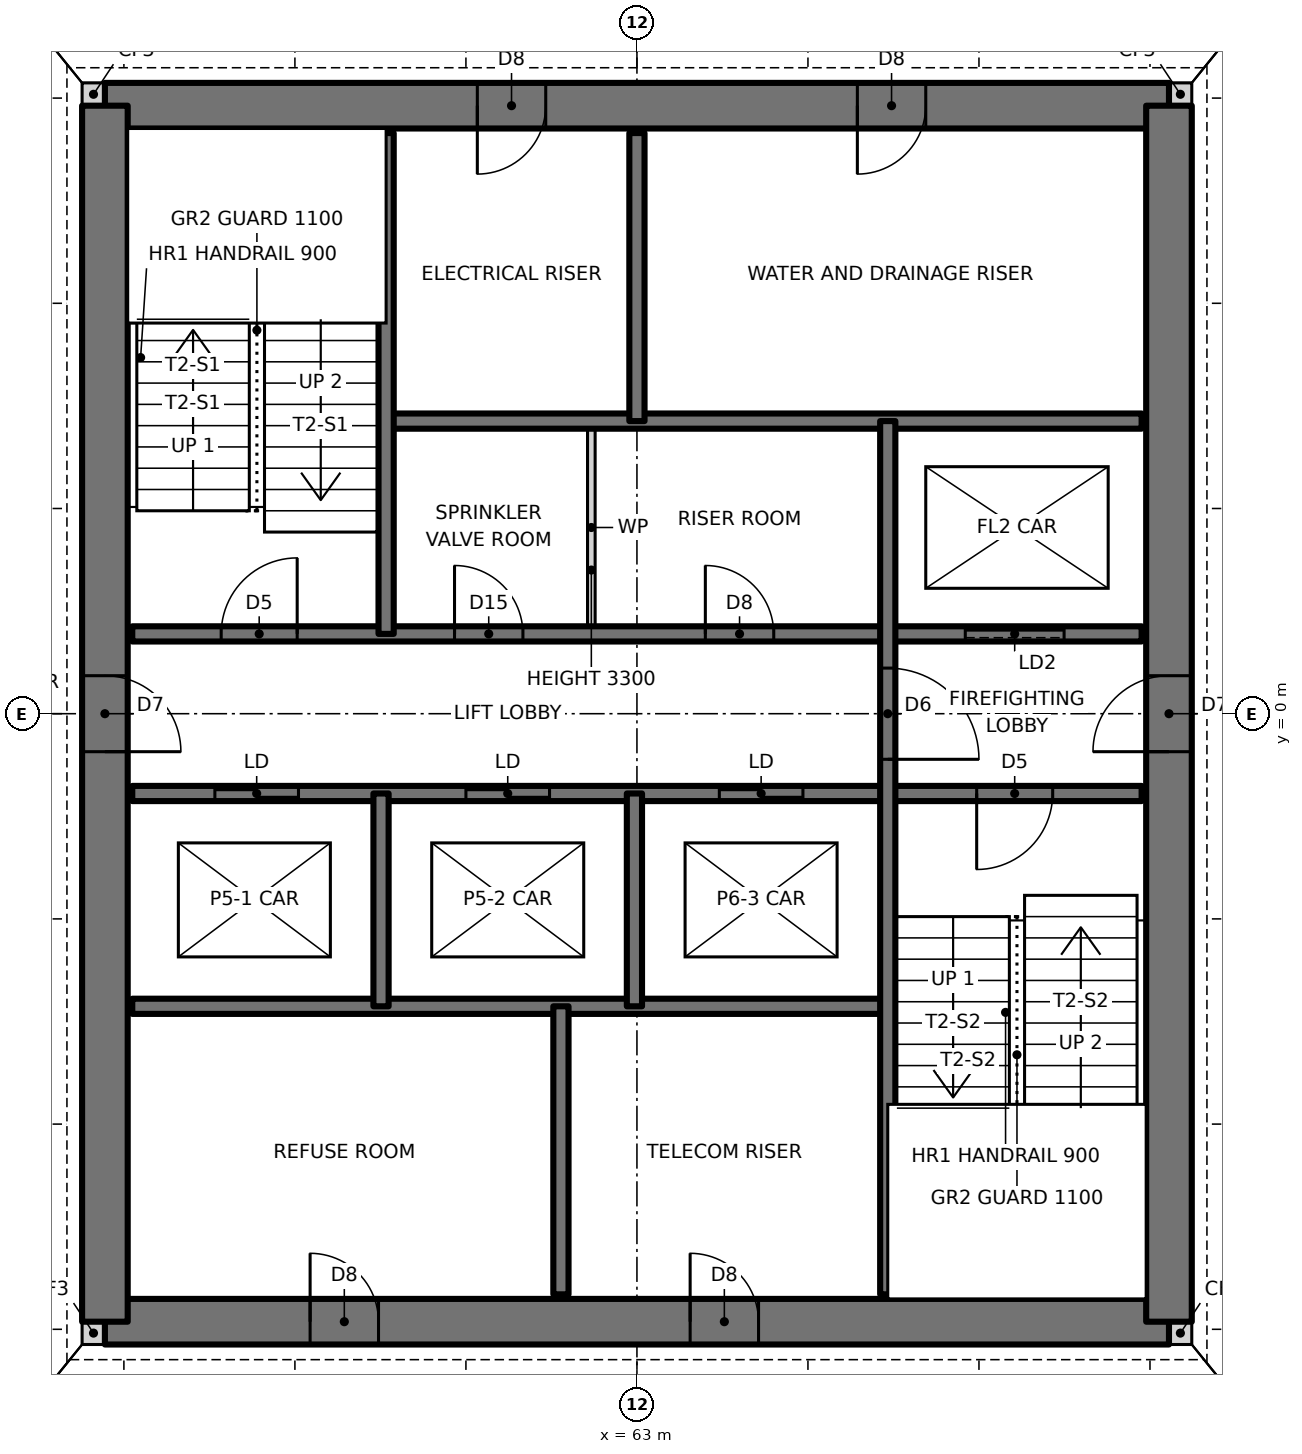
"""IFC4 building model, lengths in metres.
Left out: names, types, materials, properties, quantities, classifications, styles, units other than length and angle.
Written with IfcOpenShell. Run it as: python <this file> out.ifc"""

import sys

from ifc_helpers import new_model, si_unit, direction, frame, frame_2d, origin, place, context, subcontext, project, spatial, rectangle, extrude, element, fill, save


model = new_model("IFC4")
c1 = context("Model", 3, precision=1e-05, world=origin(), true_north=direction((0.0, 1.0)))
c2 = subcontext(c1, "Body", "Model", "MODEL_VIEW")
j1 = project(units=[si_unit("LENGTHUNIT", "METRE"), si_unit("PLANEANGLEUNIT", "RADIAN")], contexts=[c1])
p1 = place(None, origin())
s1 = spatial("IfcSite", under=j1, at=p1, CompositionType="ELEMENT")
p2 = place(p1, origin())
s2 = spatial("IfcBuilding", under=s1, at=p2, CompositionType="ELEMENT")
p3 = place(p2, frame((0.0, 0.0, 84.0)))
s3 = spatial("IfcBuildingStorey", under=s2, at=p3, CompositionType="ELEMENT", Elevation=84.0)
for number, where, z_axis, x_axis in (
    (1, (55.7, -8.15, 0.0), (0.0, 0.0, 1.0), (1.0, 0.0, 0.0)),
    (2, (70.0, -8.15, 0.0), (0.0, 0.0, 1.0), (1.0, 0.0, 0.0)),
    (3, (70.0, 8.15, 0.0), (0.0, 0.0, 1.0), (1.0, 0.0, 0.0)),
    (4, (55.7, 8.15, 0.0), (0.0, 0.0, 1.0), (1.0, 0.0, 0.0)),
):
    element("IfcWall", number, at=place(p3, frame(where, z_axis=z_axis, x_axis=x_axis)), inside=s3, PredefinedType="SOLIDWALL", context=c2, shape_type="SweptSolid", body=[
        extrude(rectangle(XDim=0.3, YDim=0.3, at=frame_2d((0.15, 0.0))), origin(), (0.0, 0.0, 1.0), 3.5),
    ])
p4 = place(p3, frame((56.0, -8.0, 0.0), z_axis=(0.0, 0.0, 1.0), x_axis=(1.0, 0.0, 0.0)))
e5 = element("IfcWall", 5, at=p4, inside=s3, PredefinedType="SHEAR", context=c2, shape_type="SweptSolid", body=[
    extrude(rectangle(XDim=14.0, YDim=0.6, at=frame_2d((7.0, 0.0))), origin(), (0.0, 0.0, 1.0), 3.5),
])
p5 = place(p4, frame((2.7, 0.0, 0.0)))
e6 = element("IfcOpeningElement", 6, at=p5, cuts=e5, PredefinedType="OPENING", context=c2, shape_type="SweptSolid", body=[
    extrude(rectangle(XDim=0.9, YDim=2.1, at=frame_2d((0.45, 1.05))), frame((0.0, 0.31, 0.0), z_axis=(0.0, -1.0, 0.0), x_axis=(1.0, 0.0, 0.0)), (0.0, 0.0, 1.0), 0.62),
])
p6 = place(p4, frame((7.7, 0.0, 0.0)))
e7 = element("IfcOpeningElement", 7, at=p6, cuts=e5, PredefinedType="OPENING", context=c2, shape_type="SweptSolid", body=[
    extrude(rectangle(XDim=0.9, YDim=2.1, at=frame_2d((0.45, 1.05))), frame((0.0, 0.31, 0.0), z_axis=(0.0, -1.0, 0.0), x_axis=(1.0, 0.0, 0.0)), (0.0, 0.0, 1.0), 0.62),
])
p7 = place(p3, frame((70.0, 8.0, 0.0), z_axis=(0.0, 0.0, 1.0), x_axis=(-1.0, 0.0, 0.0)))
e8 = element("IfcWall", 8, at=p7, inside=s3, PredefinedType="SHEAR", context=c2, shape_type="SweptSolid", body=[
    extrude(rectangle(XDim=14.0, YDim=0.6, at=frame_2d((7.0, 0.0))), origin(), (0.0, 0.0, 1.0), 3.5),
])
p8 = place(p7, frame((8.2, 0.0, 0.0)))
e9 = element("IfcOpeningElement", 9, at=p8, cuts=e8, PredefinedType="OPENING", context=c2, shape_type="SweptSolid", body=[
    extrude(rectangle(XDim=0.9, YDim=2.1, at=frame_2d((0.45, 1.05))), frame((0.0, 0.31, 0.0), z_axis=(0.0, -1.0, 0.0), x_axis=(1.0, 0.0, 0.0)), (0.0, 0.0, 1.0), 0.62),
])
p9 = place(p7, frame((3.2, 0.0, 0.0)))
e10 = element("IfcOpeningElement", 10, at=p9, cuts=e8, PredefinedType="OPENING", context=c2, shape_type="SweptSolid", body=[
    extrude(rectangle(XDim=0.9, YDim=2.1, at=frame_2d((0.45, 1.05))), frame((0.0, 0.31, 0.0), z_axis=(0.0, -1.0, 0.0), x_axis=(1.0, 0.0, 0.0)), (0.0, 0.0, 1.0), 0.62),
])
p10 = place(p3, frame((70.0, -8.0, 0.0), z_axis=(0.0, 0.0, 1.0), x_axis=(0.0, 1.0, 0.0)))
e11 = element("IfcWall", 11, at=p10, inside=s3, PredefinedType="SHEAR", context=c2, shape_type="SweptSolid", body=[
    extrude(rectangle(XDim=16.0, YDim=0.6, at=frame_2d((8.0, 0.0))), origin(), (0.0, 0.0, 1.0), 3.5),
])
p11 = place(p10, frame((7.5, 0.0, 0.0)))
e12 = element("IfcOpeningElement", 12, at=p11, cuts=e11, PredefinedType="OPENING", context=c2, shape_type="SweptSolid", body=[
    extrude(rectangle(XDim=1.0, YDim=2.1, at=frame_2d((0.5, 1.05))), frame((0.0, 0.31, 0.0), z_axis=(0.0, -1.0, 0.0), x_axis=(1.0, 0.0, 0.0)), (0.0, 0.0, 1.0), 0.62),
])
p12 = place(p3, frame((56.0, 8.0, 0.0), z_axis=(0.0, 0.0, 1.0), x_axis=(0.0, -1.0, 0.0)))
e13 = element("IfcWall", 13, at=p12, inside=s3, PredefinedType="SHEAR", context=c2, shape_type="SweptSolid", body=[
    extrude(rectangle(XDim=16.0, YDim=0.6, at=frame_2d((8.0, 0.0))), origin(), (0.0, 0.0, 1.0), 3.5),
])
p13 = place(p12, frame((7.5, 0.0, 0.0)))
e14 = element("IfcOpeningElement", 14, at=p13, cuts=e13, PredefinedType="OPENING", context=c2, shape_type="SweptSolid", body=[
    extrude(rectangle(XDim=1.0, YDim=2.1, at=frame_2d((0.5, 1.05))), frame((0.0, 0.31, 0.0), z_axis=(0.0, -1.0, 0.0), x_axis=(1.0, 0.0, 0.0)), (0.0, 0.0, 1.0), 0.62),
])
p14 = place(p3, frame((56.36, -3.85, 0.0), z_axis=(0.0, 0.0, 1.0), x_axis=(1.0, 0.0, 0.0)))
e15 = element("IfcWall", 15, at=p14, inside=s3, PredefinedType="SOLIDWALL", context=c2, shape_type="SweptSolid", body=[
    extrude(rectangle(XDim=9.94, YDim=0.2, at=frame_2d((4.97, 0.0))), origin(), (0.0, 0.0, 1.0), 3.5),
])
p15 = place(p3, frame((56.36, -1.05, 0.0), z_axis=(0.0, 0.0, 1.0), x_axis=(1.0, 0.0, 0.0)))
e16 = element("IfcWall", 16, at=p15, inside=s3, PredefinedType="SOLIDWALL", context=c2, shape_type="SweptSolid", body=[
    extrude(rectangle(XDim=13.28, YDim=0.2, at=frame_2d((6.64, 0.0))), origin(), (0.0, 0.0, 1.0), 3.5),
])
p16 = place(p15, frame((11.11, 0.0, 0.0)))
e17 = element("IfcOpeningElement", 17, at=p16, cuts=e16, PredefinedType="OPENING", context=c2, shape_type="SweptSolid", body=[
    extrude(rectangle(XDim=1.0, YDim=2.1, at=frame_2d((0.5, 1.05))), frame((0.0, 0.11, 0.0), z_axis=(0.0, -1.0, 0.0), x_axis=(1.0, 0.0, 0.0)), (0.0, 0.0, 1.0), 0.22),
])
p17 = place(p15, frame((1.087, 0.0, 0.0)))
e18 = element("IfcOpeningElement", 18, at=p17, cuts=e16, PredefinedType="OPENING", context=c2, shape_type="SweptSolid", body=[
    extrude(rectangle(XDim=1.1, YDim=2.1, at=frame_2d((0.55, 1.05))), frame((0.0, 0.11, 0.0), z_axis=(0.0, -1.0, 0.0), x_axis=(1.0, 0.0, 0.0)), (0.0, 0.0, 1.0), 0.22),
])
p18 = place(p15, frame((4.39, 0.0, 0.0)))
e19 = element("IfcOpeningElement", 19, at=p18, cuts=e16, PredefinedType="OPENING", context=c2, shape_type="SweptSolid", body=[
    extrude(rectangle(XDim=1.1, YDim=2.1, at=frame_2d((0.55, 1.05))), frame((0.0, 0.11, 0.0), z_axis=(0.0, -1.0, 0.0), x_axis=(1.0, 0.0, 0.0)), (0.0, 0.0, 1.0), 0.22),
])
p19 = place(p15, frame((7.724, 0.0, 0.0)))
e20 = element("IfcOpeningElement", 20, at=p19, cuts=e16, PredefinedType="OPENING", context=c2, shape_type="SweptSolid", body=[
    extrude(rectangle(XDim=1.1, YDim=2.1, at=frame_2d((0.55, 1.05))), frame((0.0, 0.11, 0.0), z_axis=(0.0, -1.0, 0.0), x_axis=(1.0, 0.0, 0.0)), (0.0, 0.0, 1.0), 0.22),
])
p20 = place(p3, frame((56.36, 1.05, 0.0), z_axis=(0.0, 0.0, 1.0), x_axis=(1.0, 0.0, 0.0)))
e21 = element("IfcWall", 21, at=p20, inside=s3, PredefinedType="SOLIDWALL", context=c2, shape_type="SweptSolid", body=[
    extrude(rectangle(XDim=13.28, YDim=0.2, at=frame_2d((6.64, 0.0))), origin(), (0.0, 0.0, 1.0), 3.5),
])
p21 = place(p20, frame((1.17, 0.0, 0.0)))
e22 = element("IfcOpeningElement", 22, at=p21, cuts=e21, PredefinedType="OPENING", context=c2, shape_type="SweptSolid", body=[
    extrude(rectangle(XDim=1.0, YDim=2.1, at=frame_2d((0.5, 1.05))), frame((0.0, 0.11, 0.0), z_axis=(0.0, -1.0, 0.0), x_axis=(1.0, 0.0, 0.0)), (0.0, 0.0, 1.0), 0.22),
])
p22 = place(p20, frame((7.54, 0.0, 0.0)))
e23 = element("IfcOpeningElement", 23, at=p22, cuts=e21, PredefinedType="OPENING", context=c2, shape_type="SweptSolid", body=[
    extrude(rectangle(XDim=0.9, YDim=2.1, at=frame_2d((0.45, 1.05))), frame((0.0, 0.11, 0.0), z_axis=(0.0, -1.0, 0.0), x_axis=(1.0, 0.0, 0.0)), (0.0, 0.0, 1.0), 0.22),
])
p23 = place(p20, frame((4.24, 0.0, 0.0)))
e24 = element("IfcOpeningElement", 24, at=p23, cuts=e21, PredefinedType="OPENING", context=c2, shape_type="SweptSolid", body=[
    extrude(rectangle(XDim=0.9, YDim=2.1, at=frame_2d((0.45, 1.05))), frame((0.0, 0.11, 0.0), z_axis=(0.0, -1.0, 0.0), x_axis=(1.0, 0.0, 0.0)), (0.0, 0.0, 1.0), 0.22),
])
p24 = place(p20, frame((10.96, 0.0, 0.0)))
e25 = element("IfcOpeningElement", 25, at=p24, cuts=e21, PredefinedType="OPENING", context=c2, shape_type="SweptSolid", body=[
    extrude(rectangle(XDim=1.3, YDim=2.1, at=frame_2d((0.65, 1.05))), frame((0.0, 0.11, 0.0), z_axis=(0.0, -1.0, 0.0), x_axis=(1.0, 0.0, 0.0)), (0.0, 0.0, 1.0), 0.22),
])
p25 = place(p3, frame((59.7, 3.85, 0.0), z_axis=(0.0, 0.0, 1.0), x_axis=(1.0, 0.0, 0.0)))
e26 = element("IfcWall", 26, at=p25, inside=s3, PredefinedType="SOLIDWALL", context=c2, shape_type="SweptSolid", body=[
    extrude(rectangle(XDim=9.94, YDim=0.2, at=frame_2d((4.97, 0.0))), origin(), (0.0, 0.0, 1.0), 3.5),
])
p26 = place(p3, frame((66.3, -7.64, 0.0), z_axis=(0.0, 0.0, 1.0), x_axis=(0.0, 1.0, 0.0)))
e27 = element("IfcWall", 27, at=p26, inside=s3, PredefinedType="SOLIDWALL", context=c2, shape_type="SweptSolid", body=[
    extrude(rectangle(XDim=11.49, YDim=0.2, at=frame_2d((5.745, 0.0))), origin(), (0.0, 0.0, 1.0), 3.5),
])
p27 = place(p26, frame((7.04, 0.0, 0.0)))
e28 = element("IfcOpeningElement", 28, at=p27, cuts=e27, PredefinedType="OPENING", context=c2, shape_type="SweptSolid", body=[
    extrude(rectangle(XDim=1.2, YDim=2.1, at=frame_2d((0.6, 1.05))), frame((0.0, 0.11, 0.0), z_axis=(0.0, -1.0, 0.0), x_axis=(1.0, 0.0, 0.0)), (0.0, 0.0, 1.0), 0.22),
])
p28 = place(p3, frame((63.0, 3.85, 0.0), z_axis=(0.0, 0.0, 1.0), x_axis=(0.0, 1.0, 0.0)))
e29 = element("IfcWall", 29, at=p28, inside=s3, PredefinedType="SOLIDWALL", context=c2, shape_type="SweptSolid", body=[
    extrude(rectangle(XDim=3.79, YDim=0.2, at=frame_2d((1.895, 0.0))), origin(), (0.0, 0.0, 1.0), 3.5),
])
p29 = place(p3, frame((62.967, -3.85, 0.0), z_axis=(0.0, 0.0, 1.0), x_axis=(0.0, 1.0, 0.0)))
e30 = element("IfcWall", 30, at=p29, inside=s3, PredefinedType="SOLIDWALL", context=c2, shape_type="SweptSolid", body=[
    extrude(rectangle(XDim=2.8, YDim=0.2, at=frame_2d((1.4, 0.0))), origin(), (0.0, 0.0, 1.0), 3.5),
])
p30 = place(p3, frame((62.4, 1.05, 0.0), z_axis=(0.0, 0.0, 1.0), x_axis=(0.0, 1.0, 0.0)))
e31 = element("IfcWall", 31, at=p30, inside=s3, PredefinedType="PARTITIONING", context=c2, shape_type="SweptSolid", body=[
    extrude(rectangle(XDim=2.8, YDim=0.1, at=frame_2d((1.4, 0.0))), origin(), (0.0, 0.0, 1.0), 3.3),
])
p31 = place(p3, frame((62.0, -7.64, 0.0), z_axis=(0.0, 0.0, 1.0), x_axis=(0.0, 1.0, 0.0)))
e32 = element("IfcWall", 32, at=p31, inside=s3, PredefinedType="SOLIDWALL", context=c2, shape_type="SweptSolid", body=[
    extrude(rectangle(XDim=3.79, YDim=0.2, at=frame_2d((1.895, 0.0))), origin(), (0.0, 0.0, 1.0), 3.5),
])
p32 = place(p3, frame((59.7, 1.05, 0.0), z_axis=(0.0, 0.0, 1.0), x_axis=(0.0, 1.0, 0.0)))
e33 = element("IfcWall", 33, at=p32, inside=s3, PredefinedType="SOLIDWALL", context=c2, shape_type="SweptSolid", body=[
    extrude(rectangle(XDim=6.59, YDim=0.2, at=frame_2d((3.295, 0.0))), origin(), (0.0, 0.0, 1.0), 3.5),
])
p33 = place(p3, frame((59.633, -3.85, 0.0), z_axis=(0.0, 0.0, 1.0), x_axis=(0.0, 1.0, 0.0)))
e34 = element("IfcWall", 34, at=p33, inside=s3, PredefinedType="SOLIDWALL", context=c2, shape_type="SweptSolid", body=[
    extrude(rectangle(XDim=2.8, YDim=0.2, at=frame_2d((1.4, 0.0))), origin(), (0.0, 0.0, 1.0), 3.5),
])
p34 = place(p21, origin())
e35 = element("IfcDoor", 35, at=p34, inside=s3, OperationType="SINGLE_SWING_RIGHT", PredefinedType="DOOR", context=c2, shape_type="SweptSolid", body=[
    extrude(rectangle(XDim=1.0, YDim=2.1, at=frame_2d((0.5, 1.05))), frame((0.0, 0.025, 0.0), z_axis=(0.0, -1.0, 0.0), x_axis=(1.0, 0.0, 0.0)), (0.0, 0.0, 1.0), 0.05),
])
fill(e22, e35)
p35 = place(p16, frame((1.0, 0.0, 0.0), z_axis=(0.0, 0.0, 1.0), x_axis=(-1.0, 0.0, 0.0)))
e36 = element("IfcDoor", 36, at=p35, inside=s3, OperationType="SINGLE_SWING_RIGHT", PredefinedType="DOOR", context=c2, shape_type="SweptSolid", body=[
    extrude(rectangle(XDim=1.0, YDim=2.1, at=frame_2d((0.5, 1.05))), frame((0.0, 0.025, 0.0), z_axis=(0.0, -1.0, 0.0), x_axis=(1.0, 0.0, 0.0)), (0.0, 0.0, 1.0), 0.05),
])
fill(e17, e36)
p36 = place(p27, frame((1.2, 0.0, 0.0), z_axis=(0.0, 0.0, 1.0), x_axis=(-1.0, 0.0, 0.0)))
e37 = element("IfcDoor", 37, at=p36, inside=s3, OperationType="SINGLE_SWING_RIGHT", PredefinedType="DOOR", context=c2, shape_type="SweptSolid", body=[
    extrude(rectangle(XDim=1.2, YDim=2.1, at=frame_2d((0.6, 1.05))), frame((0.0, 0.025, 0.0), z_axis=(0.0, -1.0, 0.0), x_axis=(1.0, 0.0, 0.0)), (0.0, 0.0, 1.0), 0.05),
])
fill(e28, e37)
p37 = place(p22, origin())
e38 = element("IfcDoor", 38, at=p37, inside=s3, OperationType="SINGLE_SWING_LEFT", PredefinedType="DOOR", context=c2, shape_type="SweptSolid", body=[
    extrude(rectangle(XDim=0.9, YDim=2.1, at=frame_2d((0.45, 1.05))), frame((0.0, 0.025, 0.0), z_axis=(0.0, -1.0, 0.0), x_axis=(1.0, 0.0, 0.0)), (0.0, 0.0, 1.0), 0.05),
])
fill(e23, e38)
p38 = place(p23, origin())
e39 = element("IfcDoor", 39, at=p38, inside=s3, OperationType="SINGLE_SWING_LEFT", PredefinedType="DOOR", context=c2, shape_type="SweptSolid", body=[
    extrude(rectangle(XDim=0.9, YDim=2.1, at=frame_2d((0.45, 1.05))), frame((0.0, 0.025, 0.0), z_axis=(0.0, -1.0, 0.0), x_axis=(1.0, 0.0, 0.0)), (0.0, 0.0, 1.0), 0.05),
])
fill(e24, e39)
p39 = place(p13, origin())
e40 = element("IfcDoor", 40, at=p39, inside=s3, OperationType="SINGLE_SWING_RIGHT", PredefinedType="DOOR", context=c2, shape_type="SweptSolid", body=[
    extrude(rectangle(XDim=1.0, YDim=2.1, at=frame_2d((0.5, 1.05))), frame((0.0, 0.025, 0.0), z_axis=(0.0, -1.0, 0.0), x_axis=(1.0, 0.0, 0.0)), (0.0, 0.0, 1.0), 0.05),
])
fill(e14, e40)
p40 = place(p11, origin())
e41 = element("IfcDoor", 41, at=p40, inside=s3, OperationType="SINGLE_SWING_LEFT", PredefinedType="DOOR", context=c2, shape_type="SweptSolid", body=[
    extrude(rectangle(XDim=1.0, YDim=2.1, at=frame_2d((0.5, 1.05))), frame((0.0, 0.025, 0.0), z_axis=(0.0, -1.0, 0.0), x_axis=(1.0, 0.0, 0.0)), (0.0, 0.0, 1.0), 0.05),
])
fill(e12, e41)
p41 = place(p8, origin())
e42 = element("IfcDoor", 42, at=p41, inside=s3, OperationType="SINGLE_SWING_RIGHT", PredefinedType="DOOR", context=c2, shape_type="SweptSolid", body=[
    extrude(rectangle(XDim=0.9, YDim=2.1, at=frame_2d((0.45, 1.05))), frame((0.0, 0.025, 0.0), z_axis=(0.0, -1.0, 0.0), x_axis=(1.0, 0.0, 0.0)), (0.0, 0.0, 1.0), 0.05),
])
fill(e9, e42)
p42 = place(p9, origin())
e43 = element("IfcDoor", 43, at=p42, inside=s3, OperationType="SINGLE_SWING_RIGHT", PredefinedType="DOOR", context=c2, shape_type="SweptSolid", body=[
    extrude(rectangle(XDim=0.9, YDim=2.1, at=frame_2d((0.45, 1.05))), frame((0.0, 0.025, 0.0), z_axis=(0.0, -1.0, 0.0), x_axis=(1.0, 0.0, 0.0)), (0.0, 0.0, 1.0), 0.05),
])
fill(e10, e43)
p43 = place(p5, origin())
e44 = element("IfcDoor", 44, at=p43, inside=s3, OperationType="SINGLE_SWING_LEFT", PredefinedType="DOOR", context=c2, shape_type="SweptSolid", body=[
    extrude(rectangle(XDim=0.9, YDim=2.1, at=frame_2d((0.45, 1.05))), frame((0.0, 0.025, 0.0), z_axis=(0.0, -1.0, 0.0), x_axis=(1.0, 0.0, 0.0)), (0.0, 0.0, 1.0), 0.05),
])
fill(e6, e44)
p44 = place(p6, origin())
e45 = element("IfcDoor", 45, at=p44, inside=s3, OperationType="SINGLE_SWING_LEFT", PredefinedType="DOOR", context=c2, shape_type="SweptSolid", body=[
    extrude(rectangle(XDim=0.9, YDim=2.1, at=frame_2d((0.45, 1.05))), frame((0.0, 0.025, 0.0), z_axis=(0.0, -1.0, 0.0), x_axis=(1.0, 0.0, 0.0)), (0.0, 0.0, 1.0), 0.05),
])
fill(e7, e45)
p45 = place(p17, origin())
e46 = element("IfcDoor", 46, at=p45, inside=s3, OperationType="DOUBLE_DOOR_SLIDING", PredefinedType="DOOR", context=c2, shape_type="SweptSolid", body=[
    extrude(rectangle(XDim=1.1, YDim=2.1, at=frame_2d((0.55, 1.05))), frame((0.0, 0.025, 0.0), z_axis=(0.0, -1.0, 0.0), x_axis=(1.0, 0.0, 0.0)), (0.0, 0.0, 1.0), 0.05),
])
fill(e18, e46)
p46 = place(p18, origin())
e47 = element("IfcDoor", 47, at=p46, inside=s3, OperationType="DOUBLE_DOOR_SLIDING", PredefinedType="DOOR", context=c2, shape_type="SweptSolid", body=[
    extrude(rectangle(XDim=1.1, YDim=2.1, at=frame_2d((0.55, 1.05))), frame((0.0, 0.025, 0.0), z_axis=(0.0, -1.0, 0.0), x_axis=(1.0, 0.0, 0.0)), (0.0, 0.0, 1.0), 0.05),
])
fill(e19, e47)
p47 = place(p19, origin())
e48 = element("IfcDoor", 48, at=p47, inside=s3, OperationType="DOUBLE_DOOR_SLIDING", PredefinedType="DOOR", context=c2, shape_type="SweptSolid", body=[
    extrude(rectangle(XDim=1.1, YDim=2.1, at=frame_2d((0.55, 1.05))), frame((0.0, 0.025, 0.0), z_axis=(0.0, -1.0, 0.0), x_axis=(1.0, 0.0, 0.0)), (0.0, 0.0, 1.0), 0.05),
])
fill(e20, e48)
p48 = place(p24, origin())
e49 = element("IfcDoor", 49, at=p48, inside=s3, OperationType="SLIDING_TO_LEFT", PredefinedType="DOOR", context=c2, shape_type="SweptSolid", body=[
    extrude(rectangle(XDim=1.3, YDim=2.1, at=frame_2d((0.65, 1.05))), frame((0.0, 0.025, 0.0), z_axis=(0.0, -1.0, 0.0), x_axis=(1.0, 0.0, 0.0)), (0.0, 0.0, 1.0), 0.05),
])
fill(e25, e49)
save(model, sys.argv[1])
